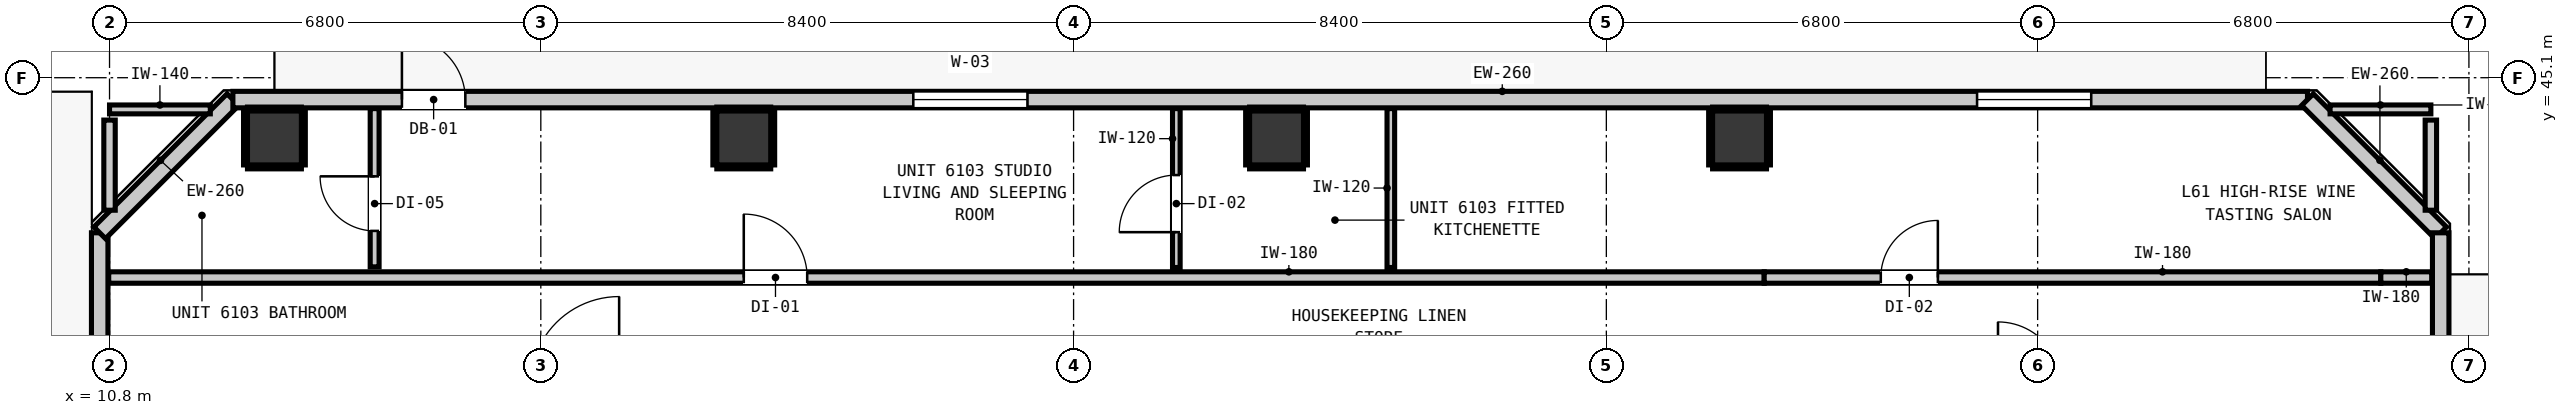
"""IFC4 building model, lengths in metres.
Left out: names, types, materials, properties, quantities, classifications, styles, units other than length and angle.
Written with IfcOpenShell. Run it as: python <this file> out.ifc"""

import sys

from ifc_helpers import new_model, si_unit, direction, frame, frame_2d, origin, origin_2d, place, context, subcontext, project, spatial, rectangle, extrude, element, fill, save


model = new_model("IFC4")
c1 = context("Model", 3, precision=1e-05, world=origin(), true_north=direction((0.0, 1.0)))
c2 = subcontext(c1, "Body", "Model", "MODEL_VIEW")
j1 = project(units=[si_unit("LENGTHUNIT", "METRE"), si_unit("PLANEANGLEUNIT", "RADIAN")], contexts=[c1])
p1 = place(None, origin())
s1 = spatial("IfcSite", under=j1, at=p1, CompositionType="ELEMENT")
p2 = place(p1, origin())
s2 = spatial("IfcBuilding", under=s1, at=p2, CompositionType="ELEMENT")
p3 = place(p2, frame((0.0, 0.0, 210.08)))
s3 = spatial("IfcBuildingStorey", under=s2, at=p3, CompositionType="ELEMENT", Elevation=210.08)
for number, where, z_axis, x_axis in (
    (1, (13.4, 44.15, -0.2), (0.0, 0.0, 1.0), (1.0, 0.0, 0.0)),
    (2, (20.8, 44.15, -0.2), (0.0, 0.0, 1.0), (1.0, 0.0, 0.0)),
    (3, (29.2, 44.15, -0.2), (0.0, 0.0, 1.0), (1.0, 0.0, 0.0)),
    (4, (36.5, 44.15, -0.2), (0.0, 0.0, 1.0), (1.0, 0.0, 0.0)),
):
    element("IfcColumn", number, at=place(p3, frame(where, z_axis=z_axis, x_axis=x_axis)), inside=s3, PredefinedType="COLUMN", context=c2, shape_type="SweptSolid", body=[
        extrude(rectangle(XDim=0.85, YDim=0.85, at=origin_2d()), origin(), (0.0, 0.0, 1.0), 3.52),
    ])
p4 = place(p3, frame((10.645, 12.345, 0.0), z_axis=(0.0, 0.0, 1.0), x_axis=(0.0, 1.0, 0.0)))
e5 = element("IfcWall", 5, at=p4, inside=s3, PredefinedType="STANDARD", context=c2, shape_type="SweptSolid", body=[
    extrude(rectangle(XDim=30.31, YDim=0.26, at=frame_2d((15.155, 0.0))), origin(), (0.0, 0.0, 1.0), 3.1),
])
p5 = place(p4, frame((0.507, 0.0, 0.0)))
e6 = element("IfcOpeningElement", 6, at=p5, cuts=e5, PredefinedType="OPENING", context=c2, shape_type="SweptSolid", body=[
    extrude(rectangle(XDim=1.1, YDim=2.15, at=frame_2d((0.55, 1.075))), frame((0.0, 0.14, 0.0), z_axis=(0.0, -1.0, 0.0), x_axis=(1.0, 0.0, 0.0)), (0.0, 0.0, 1.0), 0.28),
])
p6 = place(p4, frame((2.011, 0.0, 0.85)))
e7 = element("IfcOpeningElement", 7, at=p6, cuts=e5, PredefinedType="OPENING", context=c2, shape_type="SweptSolid", body=[
    extrude(rectangle(XDim=0.9, YDim=1.5, at=frame_2d((0.45, 0.75))), frame((0.0, 0.14, 0.0), z_axis=(0.0, -1.0, 0.0), x_axis=(1.0, 0.0, 0.0)), (0.0, 0.0, 1.0), 0.28),
])
p7 = place(p3, frame((10.645, 42.655, 0.0), z_axis=(0.0, 0.0, 1.0), x_axis=(0.707147883682, 0.707065676302, 0.0)))
e8 = element("IfcWall", 8, at=p7, inside=s3, PredefinedType="STANDARD", context=c2, shape_type="SweptSolid", body=[
    extrude(rectangle(XDim=2.97, YDim=0.26, at=frame_2d((1.485, 0.0))), origin(), (0.0, 0.0, 1.0), 3.1),
])
p8 = place(p3, frame((12.745, 44.755, 0.0), z_axis=(0.0, 0.0, 1.0), x_axis=(1.0, 0.0, 0.0)))
e9 = element("IfcWall", 9, at=p8, inside=s3, PredefinedType="STANDARD", context=c2, shape_type="SweptSolid", body=[
    extrude(rectangle(XDim=32.71, YDim=0.26, at=frame_2d((16.355, 0.0))), origin(), (0.0, 0.0, 1.0), 3.1),
])
p9 = place(p8, frame((2.665, 0.0, 0.0)))
e10 = element("IfcOpeningElement", 10, at=p9, cuts=e9, PredefinedType="OPENING", context=c2, shape_type="SweptSolid", body=[
    extrude(rectangle(XDim=1.0, YDim=2.15, at=frame_2d((0.5, 1.075))), frame((0.0, 0.14, 0.0), z_axis=(0.0, -1.0, 0.0), x_axis=(1.0, 0.0, 0.0)), (0.0, 0.0, 1.0), 0.28),
])
p10 = place(p8, frame((10.728, 0.0, 0.85)))
e11 = element("IfcOpeningElement", 11, at=p10, cuts=e9, PredefinedType="OPENING", context=c2, shape_type="SweptSolid", body=[
    extrude(rectangle(XDim=1.8, YDim=1.9, at=frame_2d((0.9, 0.95))), frame((0.0, 0.14, 0.0), z_axis=(0.0, -1.0, 0.0), x_axis=(1.0, 0.0, 0.0)), (0.0, 0.0, 1.0), 0.28),
])
p11 = place(p8, frame((27.5, 0.0, 0.85)))
e12 = element("IfcOpeningElement", 12, at=p11, cuts=e9, PredefinedType="OPENING", context=c2, shape_type="SweptSolid", body=[
    extrude(rectangle(XDim=1.8, YDim=1.9, at=frame_2d((0.9, 0.95))), frame((0.0, 0.14, 0.0), z_axis=(0.0, -1.0, 0.0), x_axis=(1.0, 0.0, 0.0)), (0.0, 0.0, 1.0), 0.28),
])
p12 = place(p3, frame((45.455, 44.755, 0.0), z_axis=(0.0, 0.0, 1.0), x_axis=(0.707106781187, -0.707106781187, 0.0)))
e13 = element("IfcWall", 13, at=p12, inside=s3, PredefinedType="STANDARD", context=c2, shape_type="SweptSolid", body=[
    extrude(rectangle(XDim=2.97, YDim=0.26, at=frame_2d((1.485, 0.0))), origin(), (0.0, 0.0, 1.0), 3.1),
])
p13 = place(p3, frame((47.555, 42.655, 0.0), z_axis=(0.0, 0.0, 1.0), x_axis=(0.0, -1.0, 0.0)))
e14 = element("IfcWall", 14, at=p13, inside=s3, PredefinedType="STANDARD", context=c2, shape_type="SweptSolid", body=[
    extrude(rectangle(XDim=30.31, YDim=0.26, at=frame_2d((15.155, 0.0))), origin(), (0.0, 0.0, 1.0), 3.1),
])
p14 = place(p13, frame((4.082, 0.0, 0.0)))
e15 = element("IfcOpeningElement", 15, at=p14, cuts=e14, PredefinedType="OPENING", context=c2, shape_type="SweptSolid", body=[
    extrude(rectangle(XDim=1.0, YDim=2.15, at=frame_2d((0.5, 1.075))), frame((0.0, 0.14, 0.0), z_axis=(0.0, -1.0, 0.0), x_axis=(1.0, 0.0, 0.0)), (0.0, 0.0, 1.0), 0.28),
])
p15 = place(p13, frame((24.251, 0.0, 0.85)))
e16 = element("IfcOpeningElement", 16, at=p15, cuts=e14, PredefinedType="OPENING", context=c2, shape_type="SweptSolid", body=[
    extrude(rectangle(XDim=1.8, YDim=1.9, at=frame_2d((0.9, 0.95))), frame((0.0, 0.14, 0.0), z_axis=(0.0, -1.0, 0.0), x_axis=(1.0, 0.0, 0.0)), (0.0, 0.0, 1.0), 0.28),
])
p16 = place(p13, frame((27.808, 0.0, 0.85)))
e17 = element("IfcOpeningElement", 17, at=p16, cuts=e14, PredefinedType="OPENING", context=c2, shape_type="SweptSolid", body=[
    extrude(rectangle(XDim=1.8, YDim=1.9, at=frame_2d((0.9, 0.95))), frame((0.0, 0.14, 0.0), z_axis=(0.0, -1.0, 0.0), x_axis=(1.0, 0.0, 0.0)), (0.0, 0.0, 1.0), 0.28),
])
p17 = place(p3, frame((10.787, 41.95, 0.0), z_axis=(0.0, 0.0, 1.0), x_axis=(1.0, 0.0, 0.0)))
e18 = element("IfcWall", 18, at=p17, inside=s3, PredefinedType="PARTITIONING", context=c2, shape_type="SweptSolid", body=[
    extrude(rectangle(XDim=26.102, YDim=0.18, at=frame_2d((13.051, 0.0))), origin(), (0.0, 0.0, 1.0), 3.1),
])
p18 = place(p17, frame((10.013, 0.0, 0.0)))
e19 = element("IfcOpeningElement", 19, at=p18, cuts=e18, PredefinedType="OPENING", context=c2, shape_type="SweptSolid", body=[
    extrude(rectangle(XDim=1.0, YDim=2.15, at=frame_2d((0.5, 1.075))), frame((0.0, 0.1, 0.0), z_axis=(0.0, -1.0, 0.0), x_axis=(1.0, 0.0, 0.0)), (0.0, 0.0, 1.0), 0.2),
])
p19 = place(p3, frame((36.889, 41.95, 0.0), z_axis=(0.0, 0.0, 1.0), x_axis=(1.0, 0.0, 0.0)))
e20 = element("IfcWall", 20, at=p19, inside=s3, PredefinedType="PARTITIONING", context=c2, shape_type="SweptSolid", body=[
    extrude(rectangle(XDim=9.722, YDim=0.18, at=frame_2d((4.861, 0.0))), origin(), (0.0, 0.0, 1.0), 2.477),
])
p20 = place(p19, frame((1.838, 0.0, 0.0)))
e21 = element("IfcOpeningElement", 21, at=p20, cuts=e20, PredefinedType="OPENING", context=c2, shape_type="SweptSolid", body=[
    extrude(rectangle(XDim=0.9, YDim=2.1, at=frame_2d((0.45, 1.05))), frame((0.0, 0.1, 0.0), z_axis=(0.0, -1.0, 0.0), x_axis=(1.0, 0.0, 0.0)), (0.0, 0.0, 1.0), 0.2),
])
p21 = place(p3, frame((46.611, 41.95, 0.0), z_axis=(0.0, 0.0, 1.0), x_axis=(1.0, 0.0, 0.0)))
e22 = element("IfcWall", 22, at=p21, inside=s3, PredefinedType="PARTITIONING", context=c2, shape_type="SweptSolid", body=[
    extrude(rectangle(XDim=0.802, YDim=0.18, at=frame_2d((0.401, 0.0))), origin(), (0.0, 0.0, 1.0), 3.1),
])
for number, where, z_axis, x_axis in (
    (23, (10.8, 44.6, 0.0), (0.0, 0.0, 1.0), (1.0, 0.0, 0.0)),
    (24, (45.811, 44.6, 0.0), (0.0, 0.0, 1.0), (1.0, 0.0, 0.0)),
):
    element("IfcWall", number, at=place(p3, frame(where, z_axis=z_axis, x_axis=x_axis)), inside=s3, PredefinedType="PARTITIONING", context=c2, shape_type="SweptSolid", body=[
        extrude(rectangle(XDim=1.589, YDim=0.14, at=frame_2d((0.794, 0.0))), origin(), (0.0, 0.0, 1.0), 3.1),
    ])
for number, where, z_axis, x_axis in (
    (25, (10.8, 43.011, 0.0), (0.0, 0.0, 1.0), (0.0, 1.0, 0.0)),
    (26, (47.4, 43.011, 0.0), (0.0, 0.0, 1.0), (0.0, 1.0, 0.0)),
):
    element("IfcWall", number, at=place(p3, frame(where, z_axis=z_axis, x_axis=x_axis)), inside=s3, PredefinedType="PARTITIONING", context=c2, shape_type="SweptSolid", body=[
        extrude(rectangle(XDim=1.421, YDim=0.18, at=frame_2d((0.71, 0.0))), origin(), (0.0, 0.0, 1.0), 3.1),
    ])
p22 = place(p3, frame((14.98, 42.118, 0.0), z_axis=(0.0, 0.0, 1.0), x_axis=(0.0, 1.0, 0.0)))
e27 = element("IfcWall", 27, at=p22, inside=s3, PredefinedType="PARTITIONING", context=c2, shape_type="SweptSolid", body=[
    extrude(rectangle(XDim=2.495, YDim=0.14, at=frame_2d((1.248, 0.0))), origin(), (0.0, 0.0, 1.0), 3.1),
])
p23 = place(p22, frame((0.567, 0.0, 0.0)))
e28 = element("IfcOpeningElement", 28, at=p23, cuts=e27, PredefinedType="OPENING", context=c2, shape_type="SweptSolid", body=[
    extrude(rectangle(XDim=0.86, YDim=2.02, at=frame_2d((0.43, 1.01))), frame((0.0, 0.08, 0.0), z_axis=(0.0, -1.0, 0.0), x_axis=(1.0, 0.0, 0.0)), (0.0, 0.0, 1.0), 0.16),
])
p24 = place(p3, frame((27.62, 42.108, 0.0), z_axis=(0.0, 0.0, 1.0), x_axis=(0.0, 1.0, 0.0)))
e29 = element("IfcWall", 29, at=p24, inside=s3, PredefinedType="PARTITIONING", context=c2, shape_type="SweptSolid", body=[
    extrude(rectangle(XDim=2.505, YDim=0.12, at=frame_2d((1.252, 0.0))), origin(), (0.0, 0.0, 1.0), 3.1),
])
p25 = place(p24, frame((0.557, 0.0, 0.0)))
e30 = element("IfcOpeningElement", 30, at=p25, cuts=e29, PredefinedType="OPENING", context=c2, shape_type="SweptSolid", body=[
    extrude(rectangle(XDim=0.9, YDim=2.1, at=frame_2d((0.45, 1.05))), frame((0.0, 0.07, 0.0), z_axis=(0.0, -1.0, 0.0), x_axis=(1.0, 0.0, 0.0)), (0.0, 0.0, 1.0), 0.14),
])
p26 = place(p3, frame((31.002, 42.108, 0.0), z_axis=(0.0, 0.0, 1.0), x_axis=(0.0, 1.0, 0.0)))
e31 = element("IfcWall", 31, at=p26, inside=s3, PredefinedType="PARTITIONING", context=c2, shape_type="SweptSolid", body=[
    extrude(rectangle(XDim=2.505, YDim=0.12, at=frame_2d((1.252, 0.0))), origin(), (0.0, 0.0, 1.0), 3.1),
])
for number, where, z_axis, x_axis in (
    (32, (12.975, 43.693, 0.0), (0.0, 0.0, 1.0), (1.0, 0.0, 0.0)),
    (33, (12.975, 44.607, 0.0), (0.0, 0.0, 1.0), (1.0, 0.0, 0.0)),
    (34, (12.943, 43.725, 0.0), (0.0, 0.0, 1.0), (0.0, 1.0, 0.0)),
    (35, (13.857, 43.725, 0.0), (0.0, 0.0, 1.0), (0.0, 1.0, 0.0)),
):
    element("IfcWall", number, at=place(p3, frame(where, z_axis=z_axis, x_axis=x_axis)), inside=s3, PredefinedType="PARTITIONING", context=c2, shape_type="SweptSolid", body=[
        extrude(rectangle(XDim=0.85, YDim=0.06, at=frame_2d((0.425, 0.0))), origin(), (0.0, 0.0, 1.0), 1.45),
    ])
for number, where, z_axis, x_axis in (
    (36, (20.375, 43.693, 0.0), (0.0, 0.0, 1.0), (1.0, 0.0, 0.0)),
    (37, (20.375, 44.607, 0.0), (0.0, 0.0, 1.0), (1.0, 0.0, 0.0)),
):
    element("IfcWall", number, at=place(p3, frame(where, z_axis=z_axis, x_axis=x_axis)), inside=s3, PredefinedType="PARTITIONING", context=c2, shape_type="SweptSolid", body=[
        extrude(rectangle(XDim=0.85, YDim=0.06, at=frame_2d((0.425, 0.0))), origin(), (0.0, 0.0, 1.0), 1.45),
    ])
for number, where, z_axis, x_axis in (
    (38, (20.343, 43.725, 0.0), (0.0, 0.0, 1.0), (0.0, 1.0, 0.0)),
    (39, (21.257, 43.725, 0.0), (0.0, 0.0, 1.0), (0.0, 1.0, 0.0)),
):
    element("IfcWall", number, at=place(p3, frame(where, z_axis=z_axis, x_axis=x_axis)), inside=s3, PredefinedType="PARTITIONING", context=c2, shape_type="SweptSolid", body=[
        extrude(rectangle(XDim=0.85, YDim=0.06, at=frame_2d((0.425, 0.0))), origin(), (0.0, 0.0, 1.0), 1.45),
    ])
for number, where, z_axis, x_axis in (
    (40, (28.775, 43.693, 0.0), (0.0, 0.0, 1.0), (1.0, 0.0, 0.0)),
    (41, (28.775, 44.607, 0.0), (0.0, 0.0, 1.0), (1.0, 0.0, 0.0)),
):
    element("IfcWall", number, at=place(p3, frame(where, z_axis=z_axis, x_axis=x_axis)), inside=s3, PredefinedType="PARTITIONING", context=c2, shape_type="SweptSolid", body=[
        extrude(rectangle(XDim=0.85, YDim=0.06, at=frame_2d((0.425, 0.0))), origin(), (0.0, 0.0, 1.0), 1.45),
    ])
for number, where, z_axis, x_axis in (
    (42, (28.743, 43.725, 0.0), (0.0, 0.0, 1.0), (0.0, 1.0, 0.0)),
    (43, (29.657, 43.725, 0.0), (0.0, 0.0, 1.0), (0.0, 1.0, 0.0)),
):
    element("IfcWall", number, at=place(p3, frame(where, z_axis=z_axis, x_axis=x_axis)), inside=s3, PredefinedType="PARTITIONING", context=c2, shape_type="SweptSolid", body=[
        extrude(rectangle(XDim=0.85, YDim=0.06, at=frame_2d((0.425, 0.0))), origin(), (0.0, 0.0, 1.0), 1.45),
    ])
for number, where, z_axis, x_axis in (
    (44, (36.075, 43.693, 0.0), (0.0, 0.0, 1.0), (1.0, 0.0, 0.0)),
    (45, (36.075, 44.607, 0.0), (0.0, 0.0, 1.0), (1.0, 0.0, 0.0)),
):
    element("IfcWall", number, at=place(p3, frame(where, z_axis=z_axis, x_axis=x_axis)), inside=s3, PredefinedType="PARTITIONING", context=c2, shape_type="SweptSolid", body=[
        extrude(rectangle(XDim=0.85, YDim=0.06, at=frame_2d((0.425, 0.0))), origin(), (0.0, 0.0, 1.0), 1.45),
    ])
for number, where, z_axis, x_axis in (
    (46, (36.043, 43.725, 0.0), (0.0, 0.0, 1.0), (0.0, 1.0, 0.0)),
    (47, (36.957, 43.725, 0.0), (0.0, 0.0, 1.0), (0.0, 1.0, 0.0)),
):
    element("IfcWall", number, at=place(p3, frame(where, z_axis=z_axis, x_axis=x_axis)), inside=s3, PredefinedType="PARTITIONING", context=c2, shape_type="SweptSolid", body=[
        extrude(rectangle(XDim=0.85, YDim=0.06, at=frame_2d((0.425, 0.0))), origin(), (0.0, 0.0, 1.0), 1.45),
    ])
p27 = place(p9, origin())
e48 = element("IfcDoor", 48, at=p27, inside=s3, OperationType="SINGLE_SWING_LEFT", PredefinedType="DOOR", context=c2, shape_type="SweptSolid", body=[
    extrude(rectangle(XDim=1.0, YDim=2.15, at=frame_2d((0.5, 1.075))), frame((0.0, 0.025, 0.0), z_axis=(0.0, -1.0, 0.0), x_axis=(1.0, 0.0, 0.0)), (0.0, 0.0, 1.0), 0.05),
])
fill(e10, e48)
p28 = place(p10, origin())
e49 = element("IfcWindow", 49, at=p28, inside=s3, PartitioningType="SINGLE_PANEL", PredefinedType="WINDOW", context=c2, shape_type="SweptSolid", body=[
    extrude(rectangle(XDim=1.8, YDim=1.9, at=frame_2d((0.9, 0.95))), frame((0.0, 0.03, 0.0), z_axis=(0.0, -1.0, 0.0), x_axis=(1.0, 0.0, 0.0)), (0.0, 0.0, 1.0), 0.06),
])
fill(e11, e49)
p29 = place(p11, origin())
e50 = element("IfcWindow", 50, at=p29, inside=s3, PartitioningType="SINGLE_PANEL", PredefinedType="WINDOW", context=c2, shape_type="SweptSolid", body=[
    extrude(rectangle(XDim=1.8, YDim=1.9, at=frame_2d((0.9, 0.95))), frame((0.0, 0.03, 0.0), z_axis=(0.0, -1.0, 0.0), x_axis=(1.0, 0.0, 0.0)), (0.0, 0.0, 1.0), 0.06),
])
fill(e12, e50)
p30 = place(p18, origin())
e51 = element("IfcDoor", 51, at=p30, inside=s3, OperationType="SINGLE_SWING_LEFT", PredefinedType="DOOR", context=c2, shape_type="SweptSolid", body=[
    extrude(rectangle(XDim=1.0, YDim=2.15, at=frame_2d((0.5, 1.075))), frame((0.0, 0.025, 0.0), z_axis=(0.0, -1.0, 0.0), x_axis=(1.0, 0.0, 0.0)), (0.0, 0.0, 1.0), 0.05),
])
fill(e19, e51)
p31 = place(p23, origin())
e52 = element("IfcDoor", 52, at=p31, inside=s3, OperationType="SINGLE_SWING_RIGHT", PredefinedType="DOOR", context=c2, shape_type="SweptSolid", body=[
    extrude(rectangle(XDim=0.86, YDim=2.02, at=frame_2d((0.43, 1.01))), frame((0.0, 0.025, 0.0), z_axis=(0.0, -1.0, 0.0), x_axis=(1.0, 0.0, 0.0)), (0.0, 0.0, 1.0), 0.05),
])
fill(e28, e52)
p32 = place(p25, origin())
e53 = element("IfcDoor", 53, at=p32, inside=s3, OperationType="SINGLE_SWING_LEFT", PredefinedType="DOOR", context=c2, shape_type="SweptSolid", body=[
    extrude(rectangle(XDim=0.9, YDim=2.1, at=frame_2d((0.45, 1.05))), frame((0.0, 0.025, 0.0), z_axis=(0.0, -1.0, 0.0), x_axis=(1.0, 0.0, 0.0)), (0.0, 0.0, 1.0), 0.05),
])
fill(e30, e53)
p33 = place(p20, origin())
e54 = element("IfcDoor", 54, at=p33, inside=s3, OperationType="SINGLE_SWING_RIGHT", PredefinedType="DOOR", context=c2, shape_type="SweptSolid", body=[
    extrude(rectangle(XDim=0.9, YDim=2.1, at=frame_2d((0.45, 1.05))), frame((0.0, 0.025, 0.0), z_axis=(0.0, -1.0, 0.0), x_axis=(1.0, 0.0, 0.0)), (0.0, 0.0, 1.0), 0.05),
])
fill(e21, e54)
save(model, sys.argv[1])
